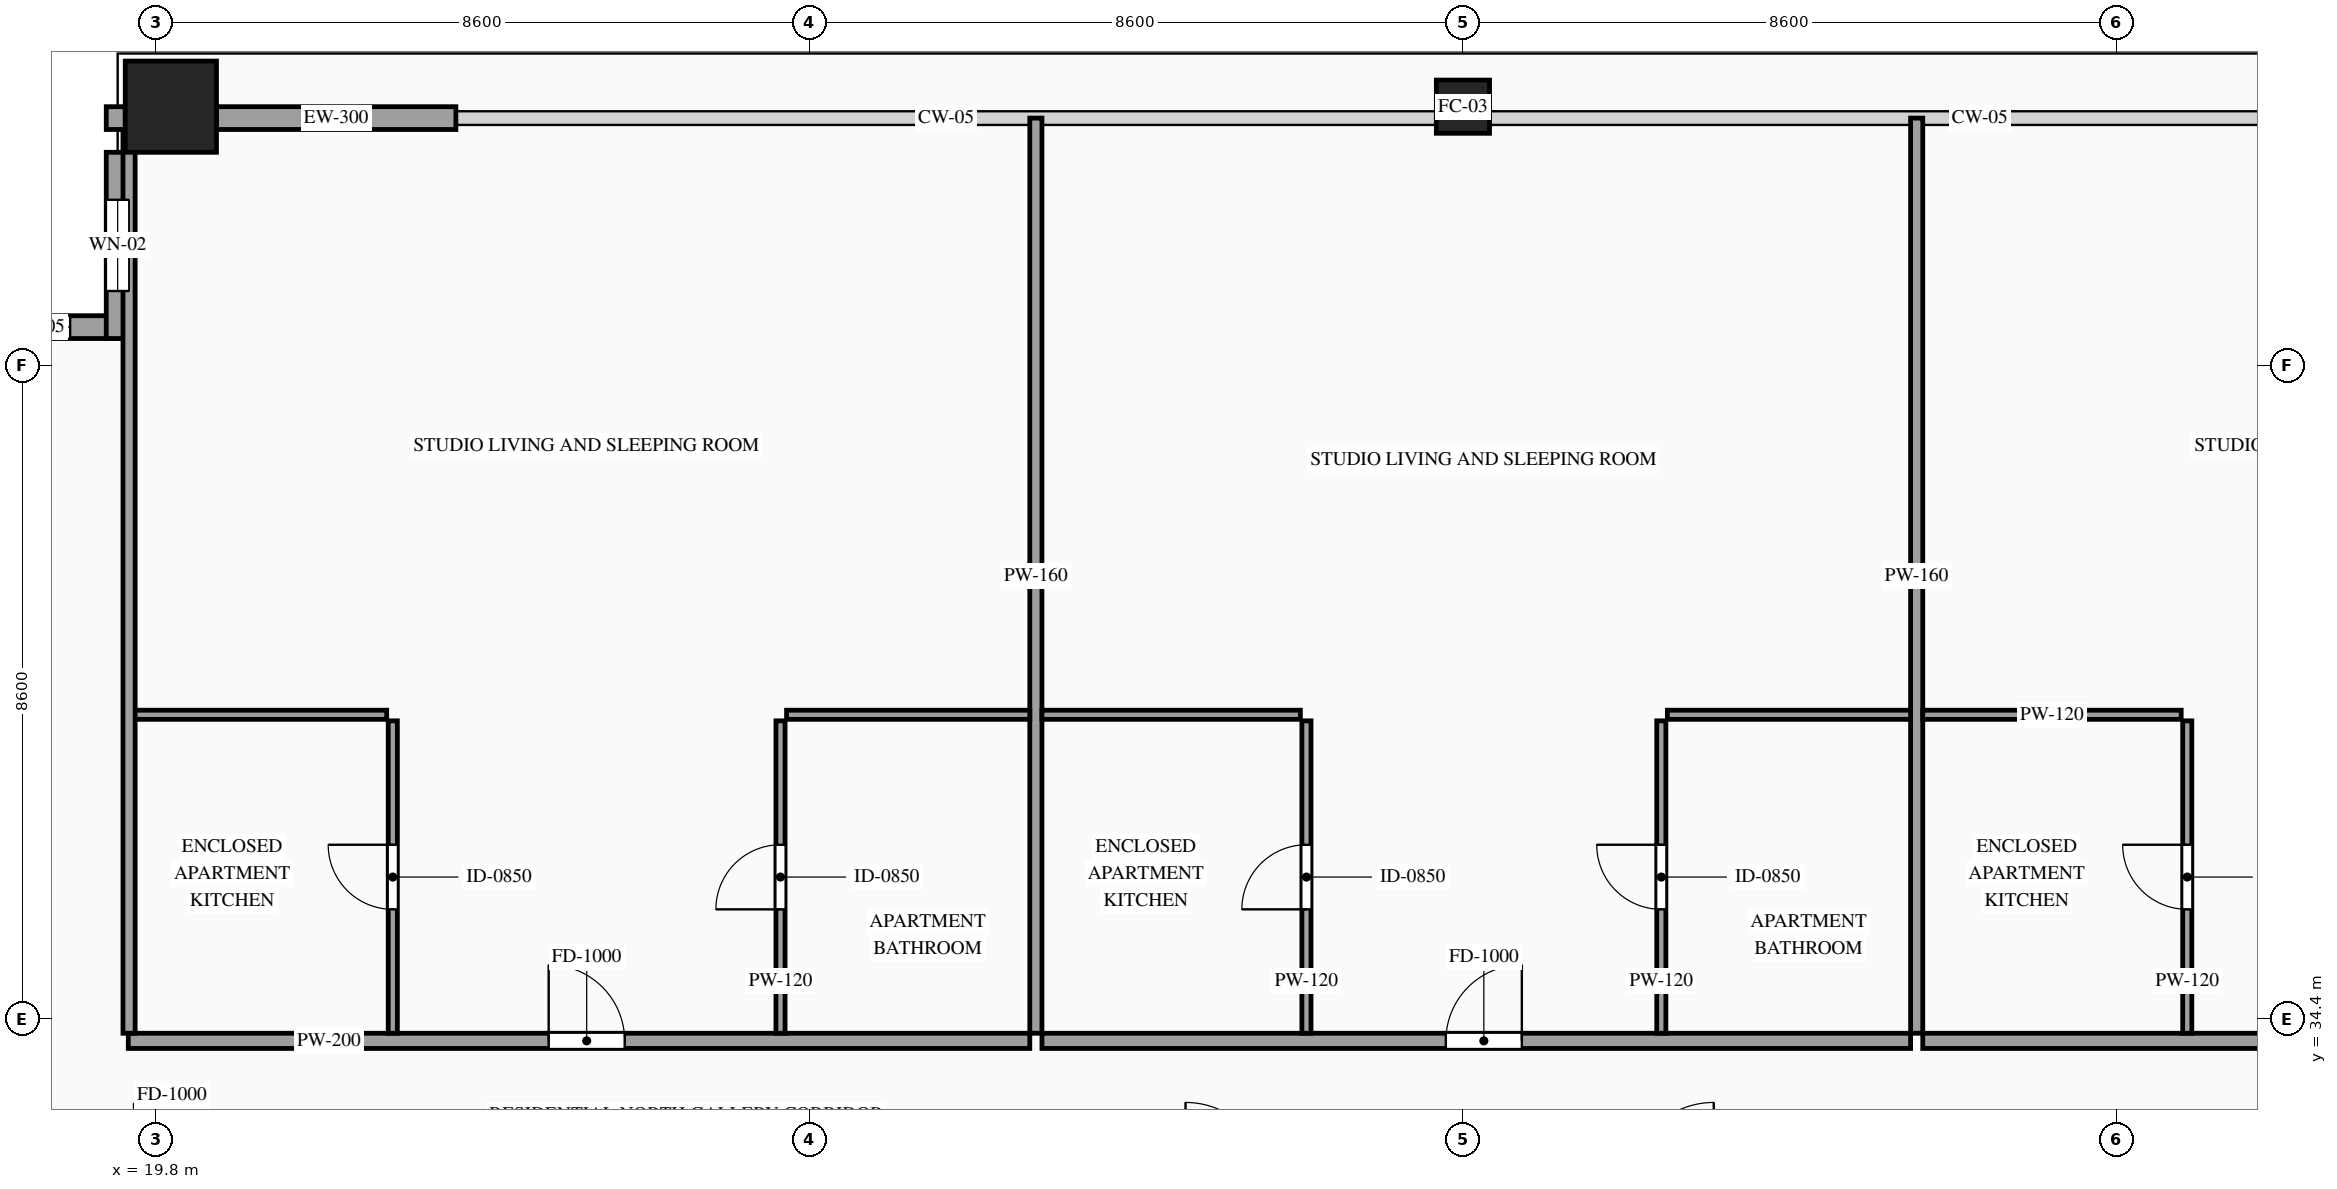
"""IFC4 building model, lengths in metres.
Left out: names, types, materials, properties, quantities, classifications, styles, units other than length and angle.
Written with IfcOpenShell. Run it as: python <this file> out.ifc"""

import sys

from ifc_helpers import new_model, si_unit, direction, frame, frame_2d, origin, origin_2d, place, context, subcontext, project, spatial, rectangle, hollow_rectangle, extrude, source, transform, mapped, element, fill, save


model = new_model("IFC4")
c1 = context("Model", 3, precision=1e-05, world=origin(), true_north=direction((0.0, 1.0)))
c2 = subcontext(c1, "Body", "Model", "MODEL_VIEW")
j1 = project(units=[si_unit("LENGTHUNIT", "METRE"), si_unit("PLANEANGLEUNIT", "RADIAN")], contexts=[c1])
p1 = place(None, origin())
s1 = spatial("IfcSite", under=j1, at=p1, CompositionType="ELEMENT")
p2 = place(p1, origin())
s2 = spatial("IfcBuilding", under=s1, at=p2, CompositionType="ELEMENT")
p3 = place(p2, frame((0.0, 0.0, 234.6)))
s3 = spatial("IfcBuildingStorey", under=s2, at=p3, CompositionType="ELEMENT", Elevation=234.6)
m1 = source(origin(), c2, "Body", "SweptSolid", [
    extrude(hollow_rectangle(XDim=1.2, YDim=1.2, WallThickness=0.055, at=origin_2d()), origin(), (0.0, 0.0, 1.0), 3.5),
])
p4 = place(p3, frame((20.0, 46.4, 0.0), z_axis=(0.0, 0.0, 1.0), x_axis=(1.0, 0.0, 0.0)))
e1 = element("IfcColumn", 1, at=p4, inside=s3, PredefinedType="COLUMN", context=c2, shape_type="MappedRepresentation", body=[
    mapped(m1, transform((0.0, 0.0, 0.0), scale=1.0)),
])
m2 = source(origin(), c2, "Body", "SweptSolid", [
    extrude(hollow_rectangle(XDim=0.7, YDim=0.7, WallThickness=0.032, at=origin_2d()), origin(), (0.0, 0.0, 1.0), 3.5),
])
p5 = place(p3, frame((37.0, 46.4, 0.0), z_axis=(0.0, 0.0, 1.0), x_axis=(1.0, 0.0, 0.0)))
e2 = element("IfcColumn", 2, at=p5, inside=s3, PredefinedType="COLUMN", context=c2, shape_type="MappedRepresentation", body=[
    mapped(m2, transform((0.0, 0.0, 0.0), scale=1.0)),
])
p6 = place(p3, frame((19.45, 43.5, 0.0), z_axis=(0.0, 0.0, 1.0), x_axis=(-1.0, 0.0, 0.0)))
e3 = element("IfcWall", 3, at=p6, inside=s3, PredefinedType="SOLIDWALL", context=c2, shape_type="SweptSolid", body=[
    extrude(rectangle(XDim=2.45, YDim=0.3, at=frame_2d((1.225, 0.0))), origin(), (0.0, 0.0, 1.0), 3.28),
])
p7 = place(p6, frame((0.775, 0.0, 0.85)))
e4 = element("IfcOpeningElement", 4, at=p7, cuts=e3, PredefinedType="OPENING", context=c2, shape_type="SweptSolid", body=[
    extrude(rectangle(XDim=0.9, YDim=1.5, at=frame_2d((0.45, 0.75))), frame((0.0, 0.165, 0.0), z_axis=(0.0, -1.0, 0.0), x_axis=(1.0, 0.0, 0.0)), (0.0, 0.0, 1.0), 0.33),
])
p8 = place(p3, frame((19.3, 45.8, 0.0), z_axis=(0.0, 0.0, 1.0), x_axis=(0.0, -1.0, 0.0)))
e5 = element("IfcWall", 5, at=p8, inside=s3, PredefinedType="SOLIDWALL", context=c2, shape_type="SweptSolid", body=[
    extrude(rectangle(XDim=2.45, YDim=0.3, at=frame_2d((1.225, 0.0))), origin(), (0.0, 0.0, 1.0), 3.28),
])
p9 = place(p8, frame((0.625, 0.0, 0.85)))
e6 = element("IfcOpeningElement", 6, at=p9, cuts=e5, PredefinedType="OPENING", context=c2, shape_type="SweptSolid", body=[
    extrude(rectangle(XDim=1.2, YDim=2.1, at=frame_2d((0.6, 1.05))), frame((0.0, 0.165, 0.0), z_axis=(0.0, -1.0, 0.0), x_axis=(1.0, 0.0, 0.0)), (0.0, 0.0, 1.0), 0.33),
])
m3 = source(origin(), c2, "Body", "SweptSolid", [
    extrude(rectangle(XDim=0.25, YDim=0.3, at=frame_2d((0.125, 0.0))), origin(), (0.0, 0.0, 1.0), 3.28),
])
p10 = place(p3, frame((19.15, 46.25, 0.0), z_axis=(0.0, 0.0, 1.0), x_axis=(1.0, 0.0, 0.0)))
e7 = element("IfcWall", 7, at=p10, inside=s3, PredefinedType="SOLIDWALL", context=c2, shape_type="MappedRepresentation", body=[
    mapped(m3, transform((0.0, 0.0, 0.0), scale=1.0)),
])
m4 = source(origin(), c2, "Body", "SweptSolid", [
    extrude(rectangle(XDim=3.15, YDim=0.3, at=frame_2d((1.575, 0.0))), origin(), (0.0, 0.0, 1.0), 2.835),
])
p11 = place(p3, frame((20.6, 46.25, 0.0), z_axis=(0.0, 0.0, 1.0), x_axis=(1.0, 0.0, 0.0)))
e8 = element("IfcWall", 8, at=p11, inside=s3, PredefinedType="SOLIDWALL", context=c2, shape_type="MappedRepresentation", body=[
    mapped(m4, transform((0.0, 0.0, 0.0), scale=1.0)),
])
p12 = place(p3, frame((19.44, 34.11, 0.0), z_axis=(0.0, 0.0, 1.0), x_axis=(1.0, 0.0, 0.0)))
e9 = element("IfcWall", 9, at=p12, inside=s3, PredefinedType="PARTITIONING", context=c2, shape_type="SweptSolid", body=[
    extrude(rectangle(XDim=11.861, YDim=0.2, at=frame_2d((5.931, 0.0))), origin(), (0.0, 0.0, 1.0), 3.28),
])
p13 = place(p12, frame((5.531, 0.0, 0.0)))
e10 = element("IfcOpeningElement", 10, at=p13, cuts=e9, PredefinedType="OPENING", context=c2, shape_type="SweptSolid", body=[
    extrude(rectangle(XDim=1.0, YDim=2.2, at=frame_2d((0.5, 1.1))), frame((0.0, 0.115, 0.0), z_axis=(0.0, -1.0, 0.0), x_axis=(1.0, 0.0, 0.0)), (0.0, 0.0, 1.0), 0.23),
])
m5 = source(origin(), c2, "Body", "SweptSolid", [
    extrude(rectangle(XDim=12.04, YDim=0.16, at=frame_2d((6.02, 0.0))), origin(), (0.0, 0.0, 1.0), 3.28),
])
p14 = place(p3, frame((31.381, 34.21, 0.0), z_axis=(0.0, 0.0, 1.0), x_axis=(0.0, 1.0, 0.0)))
e11 = element("IfcWall", 11, at=p14, inside=s3, PredefinedType="PARTITIONING", context=c2, shape_type="MappedRepresentation", body=[
    mapped(m5, transform((0.0, 0.0, 0.0), scale=1.0)),
])
m6 = source(origin(), c2, "Body", "SweptSolid", [
    extrude(rectangle(XDim=3.4, YDim=0.12, at=frame_2d((1.7, 0.0))), origin(), (0.0, 0.0, 1.0), 3.28),
])
p15 = place(p3, frame((19.44, 38.4, 0.0), z_axis=(0.0, 0.0, 1.0), x_axis=(1.0, 0.0, 0.0)))
e12 = element("IfcWall", 12, at=p15, inside=s3, PredefinedType="PARTITIONING", context=c2, shape_type="MappedRepresentation", body=[
    mapped(m6, transform((0.0, 0.0, 0.0), scale=1.0)),
])
p16 = place(p3, frame((22.92, 34.21, 0.0), z_axis=(0.0, 0.0, 1.0), x_axis=(0.0, 1.0, 0.0)))
e13 = element("IfcWall", 13, at=p16, inside=s3, PredefinedType="PARTITIONING", context=c2, shape_type="SweptSolid", body=[
    extrude(rectangle(XDim=4.11, YDim=0.12, at=frame_2d((2.055, 0.0))), origin(), (0.0, 0.0, 1.0), 3.28),
])
p17 = place(p16, frame((1.63, 0.0, 0.0)))
e14 = element("IfcOpeningElement", 14, at=p17, cuts=e13, PredefinedType="OPENING", context=c2, shape_type="SweptSolid", body=[
    extrude(rectangle(XDim=0.85, YDim=2.1, at=frame_2d((0.425, 1.05))), frame((0.0, 0.075, 0.0), z_axis=(0.0, -1.0, 0.0), x_axis=(1.0, 0.0, 0.0)), (0.0, 0.0, 1.0), 0.15),
])
m7 = source(origin(), c2, "Body", "SweptSolid", [
    extrude(rectangle(XDim=3.2, YDim=0.12, at=frame_2d((1.6, 0.0))), origin(), (0.0, 0.0, 1.0), 3.28),
])
p18 = place(p3, frame((28.101, 38.4, 0.0), z_axis=(0.0, 0.0, 1.0), x_axis=(1.0, 0.0, 0.0)))
e15 = element("IfcWall", 15, at=p18, inside=s3, PredefinedType="PARTITIONING", context=c2, shape_type="MappedRepresentation", body=[
    mapped(m7, transform((0.0, 0.0, 0.0), scale=1.0)),
])
p19 = place(p3, frame((28.021, 34.21, 0.0), z_axis=(0.0, 0.0, 1.0), x_axis=(0.0, 1.0, 0.0)))
e16 = element("IfcWall", 16, at=p19, inside=s3, PredefinedType="PARTITIONING", context=c2, shape_type="SweptSolid", body=[
    extrude(rectangle(XDim=4.11, YDim=0.12, at=frame_2d((2.055, 0.0))), origin(), (0.0, 0.0, 1.0), 3.28),
])
p20 = place(p19, frame((1.63, 0.0, 0.0)))
e17 = element("IfcOpeningElement", 17, at=p20, cuts=e16, PredefinedType="OPENING", context=c2, shape_type="SweptSolid", body=[
    extrude(rectangle(XDim=0.85, YDim=2.1, at=frame_2d((0.425, 1.05))), frame((0.0, 0.075, 0.0), z_axis=(0.0, -1.0, 0.0), x_axis=(1.0, 0.0, 0.0)), (0.0, 0.0, 1.0), 0.15),
])
p21 = place(p3, frame((31.461, 34.11, 0.0), z_axis=(0.0, 0.0, 1.0), x_axis=(1.0, 0.0, 0.0)))
e18 = element("IfcWall", 18, at=p21, inside=s3, PredefinedType="PARTITIONING", context=c2, shape_type="SweptSolid", body=[
    extrude(rectangle(XDim=11.429, YDim=0.2, at=frame_2d((5.714, 0.0))), origin(), (0.0, 0.0, 1.0), 3.28),
])
p22 = place(p21, frame((5.314, 0.0, 0.0)))
e19 = element("IfcOpeningElement", 19, at=p22, cuts=e18, PredefinedType="OPENING", context=c2, shape_type="SweptSolid", body=[
    extrude(rectangle(XDim=1.0, YDim=2.2, at=frame_2d((0.5, 1.1))), frame((0.0, 0.115, 0.0), z_axis=(0.0, -1.0, 0.0), x_axis=(1.0, 0.0, 0.0)), (0.0, 0.0, 1.0), 0.23),
])
p23 = place(p3, frame((42.97, 34.21, 0.0), z_axis=(0.0, 0.0, 1.0), x_axis=(0.0, 1.0, 0.0)))
e20 = element("IfcWall", 20, at=p23, inside=s3, PredefinedType="PARTITIONING", context=c2, shape_type="MappedRepresentation", body=[
    mapped(m5, transform((0.0, 0.0, 0.0), scale=1.0)),
])
p24 = place(p3, frame((31.461, 38.4, 0.0), z_axis=(0.0, 0.0, 1.0), x_axis=(1.0, 0.0, 0.0)))
e21 = element("IfcWall", 21, at=p24, inside=s3, PredefinedType="PARTITIONING", context=c2, shape_type="MappedRepresentation", body=[
    mapped(m6, transform((0.0, 0.0, 0.0), scale=1.0)),
])
p25 = place(p3, frame((34.941, 34.21, 0.0), z_axis=(0.0, 0.0, 1.0), x_axis=(0.0, 1.0, 0.0)))
e22 = element("IfcWall", 22, at=p25, inside=s3, PredefinedType="PARTITIONING", context=c2, shape_type="SweptSolid", body=[
    extrude(rectangle(XDim=4.11, YDim=0.12, at=frame_2d((2.055, 0.0))), origin(), (0.0, 0.0, 1.0), 3.28),
])
p26 = place(p25, frame((1.63, 0.0, 0.0)))
e23 = element("IfcOpeningElement", 23, at=p26, cuts=e22, PredefinedType="OPENING", context=c2, shape_type="SweptSolid", body=[
    extrude(rectangle(XDim=0.85, YDim=2.1, at=frame_2d((0.425, 1.05))), frame((0.0, 0.075, 0.0), z_axis=(0.0, -1.0, 0.0), x_axis=(1.0, 0.0, 0.0)), (0.0, 0.0, 1.0), 0.15),
])
p27 = place(p3, frame((39.69, 38.4, 0.0), z_axis=(0.0, 0.0, 1.0), x_axis=(1.0, 0.0, 0.0)))
e24 = element("IfcWall", 24, at=p27, inside=s3, PredefinedType="PARTITIONING", context=c2, shape_type="MappedRepresentation", body=[
    mapped(m7, transform((0.0, 0.0, 0.0), scale=1.0)),
])
p28 = place(p3, frame((39.61, 34.21, 0.0), z_axis=(0.0, 0.0, 1.0), x_axis=(0.0, 1.0, 0.0)))
e25 = element("IfcWall", 25, at=p28, inside=s3, PredefinedType="PARTITIONING", context=c2, shape_type="SweptSolid", body=[
    extrude(rectangle(XDim=4.11, YDim=0.12, at=frame_2d((2.055, 0.0))), origin(), (0.0, 0.0, 1.0), 3.28),
])
p29 = place(p28, frame((1.63, 0.0, 0.0)))
e26 = element("IfcOpeningElement", 26, at=p29, cuts=e25, PredefinedType="OPENING", context=c2, shape_type="SweptSolid", body=[
    extrude(rectangle(XDim=0.85, YDim=2.1, at=frame_2d((0.425, 1.05))), frame((0.0, 0.075, 0.0), z_axis=(0.0, -1.0, 0.0), x_axis=(1.0, 0.0, 0.0)), (0.0, 0.0, 1.0), 0.15),
])
p30 = place(p3, frame((43.05, 34.11, 0.0), z_axis=(0.0, 0.0, 1.0), x_axis=(1.0, 0.0, 0.0)))
e27 = element("IfcWall", 27, at=p30, inside=s3, PredefinedType="PARTITIONING", context=c2, shape_type="SweptSolid", body=[
    extrude(rectangle(XDim=11.51, YDim=0.2, at=frame_2d((5.755, 0.0))), origin(), (0.0, 0.0, 1.0), 3.28),
])
p31 = place(p30, frame((5.355, 0.0, 0.0)))
e28 = element("IfcOpeningElement", 28, at=p31, cuts=e27, PredefinedType="OPENING", context=c2, shape_type="SweptSolid", body=[
    extrude(rectangle(XDim=1.0, YDim=2.2, at=frame_2d((0.5, 1.1))), frame((0.0, 0.115, 0.0), z_axis=(0.0, -1.0, 0.0), x_axis=(1.0, 0.0, 0.0)), (0.0, 0.0, 1.0), 0.23),
])
m8 = source(origin(), c2, "Body", "SweptSolid", [
    extrude(rectangle(XDim=11.89, YDim=0.16, at=frame_2d((5.945, 0.0))), origin(), (0.0, 0.0, 1.0), 3.28),
])
p32 = place(p3, frame((19.45, 34.21, 0.0), z_axis=(0.0, 0.0, 1.0), x_axis=(0.0, 1.0, 0.0)))
e29 = element("IfcWall", 29, at=p32, inside=s3, PredefinedType="PARTITIONING", context=c2, shape_type="MappedRepresentation", body=[
    mapped(m8, transform((0.0, 0.0, 0.0), scale=1.0)),
])
m9 = source(origin(), c2, "Body", "SweptSolid", [
    extrude(rectangle(XDim=3.4, YDim=0.12, at=frame_2d((1.7, 0.0))), origin(), (0.0, 0.0, 1.0), 3.28),
])
p33 = place(p3, frame((43.05, 38.4, 0.0), z_axis=(0.0, 0.0, 1.0), x_axis=(1.0, 0.0, 0.0)))
e30 = element("IfcWall", 30, at=p33, inside=s3, PredefinedType="PARTITIONING", context=c2, shape_type="MappedRepresentation", body=[
    mapped(m9, transform((0.0, 0.0, 0.0), scale=1.0)),
])
p34 = place(p3, frame((46.53, 34.21, 0.0), z_axis=(0.0, 0.0, 1.0), x_axis=(0.0, 1.0, 0.0)))
e31 = element("IfcWall", 31, at=p34, inside=s3, PredefinedType="PARTITIONING", context=c2, shape_type="SweptSolid", body=[
    extrude(rectangle(XDim=4.11, YDim=0.12, at=frame_2d((2.055, 0.0))), origin(), (0.0, 0.0, 1.0), 3.28),
])
p35 = place(p34, frame((1.63, 0.0, 0.0)))
e32 = element("IfcOpeningElement", 32, at=p35, cuts=e31, PredefinedType="OPENING", context=c2, shape_type="SweptSolid", body=[
    extrude(rectangle(XDim=0.85, YDim=2.1, at=frame_2d((0.425, 1.05))), frame((0.0, 0.075, 0.0), z_axis=(0.0, -1.0, 0.0), x_axis=(1.0, 0.0, 0.0)), (0.0, 0.0, 1.0), 0.15),
])
m10 = source(origin(), c2, "Body", "SweptSolid", [
    extrude(rectangle(XDim=0.9, YDim=1.5, at=frame_2d((0.45, 0.75))), frame((0.0, 0.03, 0.0), z_axis=(0.0, -1.0, 0.0), x_axis=(1.0, 0.0, 0.0)), (0.0, 0.0, 1.0), 0.06),
])
p36 = place(p7, origin())
e33 = element("IfcWindow", 33, at=p36, inside=s3, PartitioningType="SINGLE_PANEL", PredefinedType="WINDOW", context=c2, shape_type="MappedRepresentation", body=[
    mapped(m10, transform((0.0, 0.0, 0.0), scale=1.0)),
])
fill(e4, e33)
m11 = source(origin(), c2, "Body", "SweptSolid", [
    extrude(rectangle(XDim=1.2, YDim=2.1, at=frame_2d((0.6, 1.05))), frame((0.0, 0.03, 0.0), z_axis=(0.0, -1.0, 0.0), x_axis=(1.0, 0.0, 0.0)), (0.0, 0.0, 1.0), 0.06),
])
p37 = place(p9, origin())
e34 = element("IfcWindow", 34, at=p37, inside=s3, PartitioningType="SINGLE_PANEL", PredefinedType="WINDOW", context=c2, shape_type="MappedRepresentation", body=[
    mapped(m11, transform((0.0, 0.0, 0.0), scale=1.0)),
])
fill(e6, e34)
m12 = source(origin(), c2, "Body", "SweptSolid", [
    extrude(rectangle(XDim=1.0, YDim=2.2, at=frame_2d((0.5, 1.1))), frame((0.0, 0.025, 0.0), z_axis=(0.0, -1.0, 0.0), x_axis=(1.0, 0.0, 0.0)), (0.0, 0.0, 1.0), 0.05),
])
p38 = place(p13, origin())
e35 = element("IfcDoor", 35, at=p38, inside=s3, OperationType="SINGLE_SWING_LEFT", PredefinedType="DOOR", context=c2, shape_type="MappedRepresentation", body=[
    mapped(m12, transform((0.0, 0.0, 0.0), scale=1.0)),
])
fill(e10, e35)
m13 = source(origin(), c2, "Body", "SweptSolid", [
    extrude(rectangle(XDim=0.85, YDim=2.1, at=frame_2d((0.425, 1.05))), frame((0.0, 0.025, 0.0), z_axis=(0.0, -1.0, 0.0), x_axis=(1.0, 0.0, 0.0)), (0.0, 0.0, 1.0), 0.05),
])
p39 = place(p17, origin())
e36 = element("IfcDoor", 36, at=p39, inside=s3, OperationType="SINGLE_SWING_RIGHT", PredefinedType="DOOR", context=c2, shape_type="MappedRepresentation", body=[
    mapped(m13, transform((0.0, 0.0, 0.0), scale=1.0)),
])
fill(e14, e36)
p40 = place(p20, origin())
e37 = element("IfcDoor", 37, at=p40, inside=s3, OperationType="SINGLE_SWING_LEFT", PredefinedType="DOOR", context=c2, shape_type="MappedRepresentation", body=[
    mapped(m13, transform((0.0, 0.0, 0.0), scale=1.0)),
])
fill(e17, e37)
p41 = place(p22, origin())
e38 = element("IfcDoor", 38, at=p41, inside=s3, OperationType="SINGLE_SWING_RIGHT", PredefinedType="DOOR", context=c2, shape_type="MappedRepresentation", body=[
    mapped(m12, transform((0.0, 0.0, 0.0), scale=1.0)),
])
fill(e19, e38)
p42 = place(p26, origin())
e39 = element("IfcDoor", 39, at=p42, inside=s3, OperationType="SINGLE_SWING_LEFT", PredefinedType="DOOR", context=c2, shape_type="MappedRepresentation", body=[
    mapped(m13, transform((0.0, 0.0, 0.0), scale=1.0)),
])
fill(e23, e39)
p43 = place(p29, origin())
e40 = element("IfcDoor", 40, at=p43, inside=s3, OperationType="SINGLE_SWING_RIGHT", PredefinedType="DOOR", context=c2, shape_type="MappedRepresentation", body=[
    mapped(m13, transform((0.0, 0.0, 0.0), scale=1.0)),
])
fill(e26, e40)
p44 = place(p35, origin())
e41 = element("IfcDoor", 41, at=p44, inside=s3, OperationType="SINGLE_SWING_RIGHT", PredefinedType="DOOR", context=c2, shape_type="MappedRepresentation", body=[
    mapped(m13, transform((0.0, 0.0, 0.0), scale=1.0)),
])
fill(e32, e41)
save(model, sys.argv[1])
